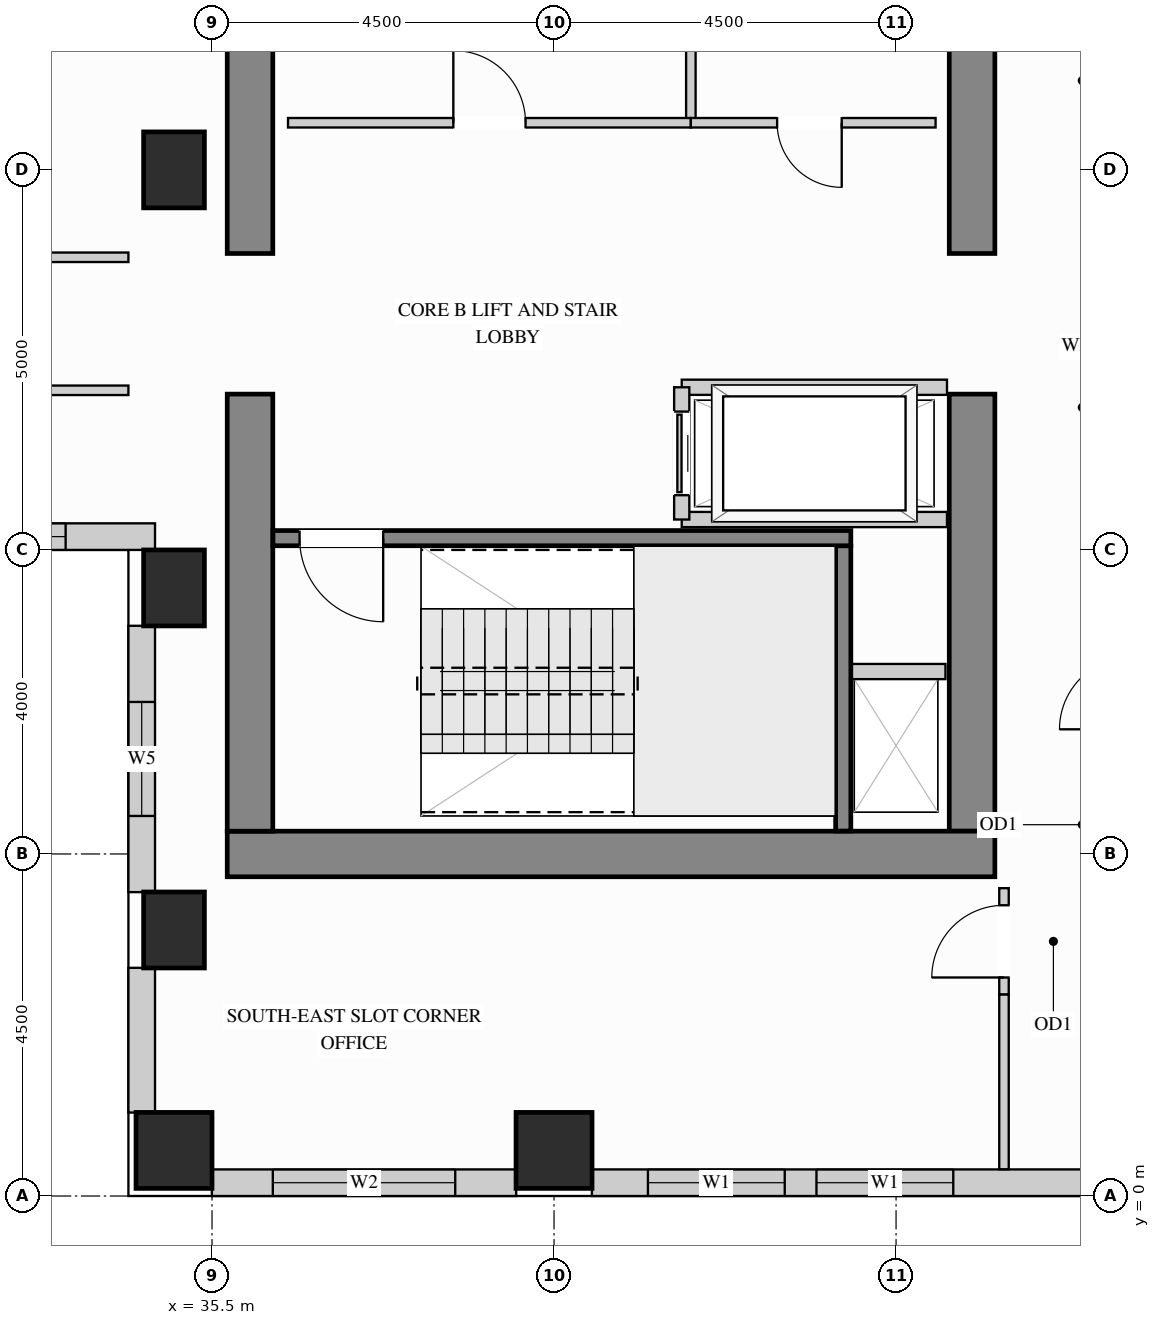
"""IFC4 building model, lengths in metres.
Left out: names, types, materials, properties, quantities, classifications, styles, units other than length and angle.
Written with IfcOpenShell. Run it as: python <this file> out.ifc"""

import sys

from ifc_helpers import new_model, si_unit, direction, frame, frame_2d, origin, origin_2d, place, context, subcontext, project, spatial, rectangle, extrude, source, transform, mapped, element, fill, save


model = new_model("IFC4")
c1 = context("Model", 3, precision=1e-05, world=origin(), true_north=direction((0.0, 1.0)))
c2 = subcontext(c1, "Body", "Model", "MODEL_VIEW")
j1 = project(units=[si_unit("LENGTHUNIT", "METRE"), si_unit("PLANEANGLEUNIT", "RADIAN")], contexts=[c1])
p1 = place(None, origin())
s1 = spatial("IfcSite", under=j1, at=p1, CompositionType="ELEMENT")
p2 = place(p1, origin())
s2 = spatial("IfcBuilding", under=s1, at=p2, CompositionType="ELEMENT")
p3 = place(p2, frame((0.0, 0.0, 153.9)))
s3 = spatial("IfcBuildingStorey", under=s2, at=p3, CompositionType="ELEMENT", Elevation=153.9)
m1 = source(origin(), c2, "Body", "SweptSolid", [
    extrude(rectangle(XDim=0.8, YDim=1.0, at=origin_2d()), origin(), (0.0, 0.0, 1.0), 3.4),
])
for number, where, z_axis, x_axis in (
    (1, (35.0, 13.5, 0.0), (0.0, 0.0, 1.0), (1.0, 0.0, 0.0)),
    (2, (35.0, 3.5, 0.0), (0.0, 0.0, 1.0), (1.0, 0.0, 0.0)),
    (3, (35.0, 8.0, 0.0), (0.0, 0.0, 1.0), (1.0, 0.0, 0.0)),
):
    element("IfcColumn", number, at=place(p3, frame(where, z_axis=z_axis, x_axis=x_axis)), inside=s3, PredefinedType="COLUMN", context=c2, shape_type="MappedRepresentation", body=[
        mapped(m1, transform((0.0, 0.0, 0.0), x_axis=(1.0, 0.0, 0.0), y_axis=(0.0, 1.0, 0.0), z_axis=(0.0, 0.0, 1.0))),
    ])
m2 = source(origin(), c2, "Body", "SweptSolid", [
    extrude(rectangle(XDim=1.0, YDim=1.0, at=origin_2d()), origin(), (0.0, 0.0, 1.0), 3.4),
])
for number, where, z_axis, x_axis in (
    (4, (35.0, 0.6, 0.0), (0.0, 0.0, 1.0), (1.0, 0.0, 0.0)),
    (5, (40.0, 0.6, 0.0), (0.0, 0.0, 1.0), (1.0, 0.0, 0.0)),
):
    element("IfcColumn", number, at=place(p3, frame(where, z_axis=z_axis, x_axis=x_axis)), inside=s3, PredefinedType="COLUMN", context=c2, shape_type="MappedRepresentation", body=[
        mapped(m2, transform((0.0, 0.0, 0.0), x_axis=(1.0, 0.0, 0.0), y_axis=(0.0, 1.0, 0.0), z_axis=(0.0, 0.0, 1.0))),
    ])
m3 = source(origin(), c2, "Body", "SweptSolid", [
    extrude(rectangle(XDim=5.75, YDim=0.6, at=frame_2d((2.875, 0.0))), origin(), (0.0, 0.0, 1.0), 3.4),
])
p4 = place(p3, frame((45.5, 4.8, 0.0), z_axis=(0.0, 0.0, 1.0), x_axis=(0.0, 1.0, 0.0)))
e6 = element("IfcWall", 6, at=p4, inside=s3, PredefinedType="SHEAR", context=c2, shape_type="MappedRepresentation", body=[
    mapped(m3, transform((0.0, 0.0, 0.0), x_axis=(1.0, 0.0, 0.0), y_axis=(0.0, 1.0, 0.0), z_axis=(0.0, 0.0, 1.0))),
])
m4 = source(origin(), c2, "Body", "SweptSolid", [
    extrude(rectangle(XDim=3.8, YDim=0.6, at=frame_2d((1.9, 0.0))), origin(), (0.0, 0.0, 1.0), 3.4),
])
p5 = place(p3, frame((45.5, 12.4, 0.0), z_axis=(0.0, 0.0, 1.0), x_axis=(0.0, 1.0, 0.0)))
e7 = element("IfcWall", 7, at=p5, inside=s3, PredefinedType="SHEAR", context=c2, shape_type="MappedRepresentation", body=[
    mapped(m4, transform((0.0, 0.0, 0.0), x_axis=(1.0, 0.0, 0.0), y_axis=(0.0, 1.0, 0.0), z_axis=(0.0, 0.0, 1.0))),
])
m5 = source(origin(), c2, "Body", "SweptSolid", [
    extrude(rectangle(XDim=10.1, YDim=0.6, at=frame_2d((5.05, 0.0))), origin(), (0.0, 0.0, 1.0), 3.4),
])
p6 = place(p3, frame((35.7, 4.5, 0.0), z_axis=(0.0, 0.0, 1.0), x_axis=(1.0, 0.0, 0.0)))
e8 = element("IfcWall", 8, at=p6, inside=s3, PredefinedType="SHEAR", context=c2, shape_type="MappedRepresentation", body=[
    mapped(m5, transform((0.0, 0.0, 0.0), x_axis=(1.0, 0.0, 0.0), y_axis=(0.0, 1.0, 0.0), z_axis=(0.0, 0.0, 1.0))),
])
p7 = place(p3, frame((36.0, 4.8, 0.0), z_axis=(0.0, 0.0, 1.0), x_axis=(0.0, 1.0, 0.0)))
e9 = element("IfcWall", 9, at=p7, inside=s3, PredefinedType="SHEAR", context=c2, shape_type="MappedRepresentation", body=[
    mapped(m3, transform((0.0, 0.0, 0.0), x_axis=(1.0, 0.0, 0.0), y_axis=(0.0, 1.0, 0.0), z_axis=(0.0, 0.0, 1.0))),
])
p8 = place(p3, frame((36.0, 12.4, 0.0), z_axis=(0.0, 0.0, 1.0), x_axis=(0.0, 1.0, 0.0)))
e10 = element("IfcWall", 10, at=p8, inside=s3, PredefinedType="SHEAR", context=c2, shape_type="MappedRepresentation", body=[
    mapped(m4, transform((0.0, 0.0, 0.0), x_axis=(1.0, 0.0, 0.0), y_axis=(0.0, 1.0, 0.0), z_axis=(0.0, 0.0, 1.0))),
])
p9 = place(p3, frame((30.898, 8.675, 0.0), z_axis=(0.0, 0.0, 1.0), x_axis=(1.0, 0.0, 0.0)))
e11 = element("IfcWall", 11, at=p9, inside=s3, PredefinedType="SOLIDWALL", context=c2, shape_type="SweptSolid", body=[
    extrude(rectangle(XDim=3.852, YDim=0.35, at=frame_2d((1.926, 0.0))), origin(), (0.0, 0.0, 1.0), 3.385),
])
p10 = place(p9, frame((1.176, 0.0, 0.78)))
e12 = element("IfcOpeningElement", 12, at=p10, cuts=e11, PredefinedType="OPENING", context=c2, shape_type="SweptSolid", body=[
    extrude(rectangle(XDim=1.5, YDim=2.0, at=frame_2d((0.75, 1.0))), frame((0.0, 0.185, 0.0), z_axis=(0.0, -1.0, 0.0), x_axis=(1.0, 0.0, 0.0)), (0.0, 0.0, 1.0), 0.37),
])
p11 = place(p3, frame((34.575, 7.502, 0.0), z_axis=(0.0, 0.0, 1.0), x_axis=(0.0, -1.0, 0.0)))
e13 = element("IfcWall", 13, at=p11, inside=s3, PredefinedType="SOLIDWALL", context=c2, shape_type="SweptSolid", body=[
    extrude(rectangle(XDim=3.504, YDim=0.35, at=frame_2d((1.752, 0.0))), origin(), (0.0, 0.0, 1.0), 2.612),
])
p12 = place(p11, frame((1.002, 0.0, 0.78)))
e14 = element("IfcOpeningElement", 14, at=p12, cuts=e13, PredefinedType="OPENING", context=c2, shape_type="SweptSolid", body=[
    extrude(rectangle(XDim=1.5, YDim=1.652, at=frame_2d((0.75, 0.826))), frame((0.0, 0.185, 0.0), z_axis=(0.0, -1.0, 0.0), x_axis=(1.0, 0.0, 0.0)), (0.0, 0.0, 1.0), 0.37),
])
m6 = source(origin(), c2, "Body", "SweptSolid", [
    extrude(rectangle(XDim=1.904, YDim=0.35, at=frame_2d((0.952, 0.0))), origin(), (0.0, 0.0, 1.0), 2.612),
])
p13 = place(p3, frame((34.575, 3.002, 0.0), z_axis=(0.0, 0.0, 1.0), x_axis=(0.0, -1.0, 0.0)))
e15 = element("IfcWall", 15, at=p13, inside=s3, PredefinedType="SOLIDWALL", context=c2, shape_type="MappedRepresentation", body=[
    mapped(m6, transform((0.0, 0.0, 0.0), x_axis=(1.0, 0.0, 0.0), y_axis=(0.0, 1.0, 0.0), z_axis=(0.0, 0.0, 1.0))),
])
p14 = place(p3, frame((35.498, 0.175, 0.0), z_axis=(0.0, 0.0, 1.0), x_axis=(1.0, 0.0, 0.0)))
e16 = element("IfcWall", 16, at=p14, inside=s3, PredefinedType="SOLIDWALL", context=c2, shape_type="SweptSolid", body=[
    extrude(rectangle(XDim=4.004, YDim=0.35, at=frame_2d((2.002, 0.0))), origin(), (0.0, 0.0, 1.0), 2.612),
])
p15 = place(p14, frame((0.802, 0.0, 0.78)))
e17 = element("IfcOpeningElement", 17, at=p15, cuts=e16, PredefinedType="OPENING", context=c2, shape_type="SweptSolid", body=[
    extrude(rectangle(XDim=2.4, YDim=1.652, at=frame_2d((1.2, 0.826))), frame((0.0, 0.185, 0.0), z_axis=(0.0, -1.0, 0.0), x_axis=(1.0, 0.0, 0.0)), (0.0, 0.0, 1.0), 0.37),
])
p16 = place(p3, frame((40.498, 0.175, 0.0), z_axis=(0.0, 0.0, 1.0), x_axis=(1.0, 0.0, 0.0)))
e18 = element("IfcWall", 18, at=p16, inside=s3, PredefinedType="SOLIDWALL", context=c2, shape_type="SweptSolid", body=[
    extrude(rectangle(XDim=6.604, YDim=0.35, at=frame_2d((3.302, 0.0))), origin(), (0.0, 0.0, 1.0), 2.612),
])
p17 = place(p16, frame((0.737, 0.0, 0.78)))
e19 = element("IfcOpeningElement", 19, at=p17, cuts=e18, PredefinedType="OPENING", context=c2, shape_type="SweptSolid", body=[
    extrude(rectangle(XDim=1.8, YDim=1.652, at=frame_2d((0.9, 0.826))), frame((0.0, 0.185, 0.0), z_axis=(0.0, -1.0, 0.0), x_axis=(1.0, 0.0, 0.0)), (0.0, 0.0, 1.0), 0.37),
])
p18 = place(p16, frame((2.955, 0.0, 0.78)))
e20 = element("IfcOpeningElement", 20, at=p18, cuts=e18, PredefinedType="OPENING", context=c2, shape_type="SweptSolid", body=[
    extrude(rectangle(XDim=1.8, YDim=1.652, at=frame_2d((0.9, 0.826))), frame((0.0, 0.185, 0.0), z_axis=(0.0, -1.0, 0.0), x_axis=(1.0, 0.0, 0.0)), (0.0, 0.0, 1.0), 0.37),
])
m7 = source(origin(), c2, "Body", "SweptSolid", [
    extrude(rectangle(XDim=1.93, YDim=0.125, at=frame_2d((0.965, 0.0))), origin(), (0.0, 0.0, 1.0), 3.385),
])
p19 = place(p3, frame((41.8, 14.12, 0.0), z_axis=(0.0, 0.0, 1.0), x_axis=(0.0, 1.0, 0.0)))
e21 = element("IfcWall", 21, at=p19, inside=s3, PredefinedType="PARTITIONING", context=c2, shape_type="MappedRepresentation", body=[
    mapped(m7, transform((0.0, 0.0, 0.0), x_axis=(1.0, 0.0, 0.0), y_axis=(0.0, 1.0, 0.0), z_axis=(0.0, 0.0, 1.0))),
])
p20 = place(p3, frame((36.5, 14.12, 0.0), z_axis=(0.0, 0.0, 1.0), x_axis=(1.0, 0.0, 0.0)))
e22 = element("IfcWall", 22, at=p20, inside=s3, PredefinedType="PARTITIONING", context=c2, shape_type="SweptSolid", body=[
    extrude(rectangle(XDim=5.3, YDim=0.125, at=frame_2d((2.65, 0.0))), origin(), (0.0, 0.0, 1.0), 3.385),
])
p21 = place(p20, frame((2.175, 0.0, 0.0)))
e23 = element("IfcOpeningElement", 23, at=p21, cuts=e22, PredefinedType="OPENING", context=c2, shape_type="SweptSolid", body=[
    extrude(rectangle(XDim=0.95, YDim=2.15, at=frame_2d((0.475, 1.075))), frame((0.0, 0.073, 0.0), z_axis=(0.0, -1.0, 0.0), x_axis=(1.0, 0.0, 0.0)), (0.0, 0.0, 1.0), 0.145),
])
p22 = place(p3, frame((41.8, 14.12, 0.0), z_axis=(0.0, 0.0, 1.0), x_axis=(1.0, 0.0, 0.0)))
e24 = element("IfcWall", 24, at=p22, inside=s3, PredefinedType="PARTITIONING", context=c2, shape_type="SweptSolid", body=[
    extrude(rectangle(XDim=3.22, YDim=0.125, at=frame_2d((1.61, 0.0))), origin(), (0.0, 0.0, 1.0), 3.385),
])
p23 = place(p22, frame((1.135, 0.0, 0.0)))
e25 = element("IfcOpeningElement", 25, at=p23, cuts=e24, PredefinedType="OPENING", context=c2, shape_type="SweptSolid", body=[
    extrude(rectangle(XDim=0.85, YDim=2.1, at=frame_2d((0.425, 1.05))), frame((0.0, 0.073, 0.0), z_axis=(0.0, -1.0, 0.0), x_axis=(1.0, 0.0, 0.0)), (0.0, 0.0, 1.0), 0.145),
])
p24 = place(p3, frame((45.92, 2.65, 0.0), z_axis=(0.0, 0.0, 1.0), x_axis=(0.0, 1.0, 0.0)))
e26 = element("IfcWall", 26, at=p24, inside=s3, PredefinedType="PARTITIONING", context=c2, shape_type="SweptSolid", body=[
    extrude(rectangle(XDim=1.4, YDim=0.125, at=frame_2d((0.7, 0.0))), origin(), (0.0, 0.0, 1.0), 3.385),
])
p25 = place(p24, frame((0.225, 0.0, 0.0)))
e27 = element("IfcOpeningElement", 27, at=p25, cuts=e26, PredefinedType="OPENING", context=c2, shape_type="SweptSolid", body=[
    extrude(rectangle(XDim=0.95, YDim=2.15, at=frame_2d((0.475, 1.075))), frame((0.0, 0.073, 0.0), z_axis=(0.0, -1.0, 0.0), x_axis=(1.0, 0.0, 0.0)), (0.0, 0.0, 1.0), 0.145),
])
m8 = source(origin(), c2, "Body", "SweptSolid", [
    extrude(rectangle(XDim=2.298, YDim=0.125, at=frame_2d((1.149, 0.0))), origin(), (0.0, 0.0, 1.0), 3.385),
])
p26 = place(p3, frame((45.92, 0.352, 0.0), z_axis=(0.0, 0.0, 1.0), x_axis=(0.0, 1.0, 0.0)))
e28 = element("IfcWall", 28, at=p26, inside=s3, PredefinedType="PARTITIONING", context=c2, shape_type="MappedRepresentation", body=[
    mapped(m8, transform((0.0, 0.0, 0.0), x_axis=(1.0, 0.0, 0.0), y_axis=(0.0, 1.0, 0.0), z_axis=(0.0, 0.0, 1.0))),
])
p27 = place(p3, frame((29.85, 12.35, 0.0), z_axis=(0.0, 0.0, 1.0), x_axis=(1.0, 0.0, 0.0)))
e29 = element("IfcWall", 29, at=p27, inside=s3, PredefinedType="PARTITIONING", context=c2, shape_type="SweptSolid", body=[
    extrude(rectangle(XDim=4.55, YDim=0.125, at=frame_2d((2.275, 0.0))), origin(), (0.0, 0.0, 1.0), 3.385),
])
p28 = place(p27, frame((1.8, 0.0, 0.0)))
e30 = element("IfcOpeningElement", 30, at=p28, cuts=e29, PredefinedType="OPENING", context=c2, shape_type="SweptSolid", body=[
    extrude(rectangle(XDim=0.95, YDim=2.15, at=frame_2d((0.475, 1.075))), frame((0.0, 0.073, 0.0), z_axis=(0.0, -1.0, 0.0), x_axis=(1.0, 0.0, 0.0)), (0.0, 0.0, 1.0), 0.145),
])
p29 = place(p3, frame((19.5, 10.6, 0.0), z_axis=(0.0, 0.0, 1.0), x_axis=(1.0, 0.0, 0.0)))
e31 = element("IfcWall", 31, at=p29, inside=s3, PredefinedType="PARTITIONING", context=c2, shape_type="SweptSolid", body=[
    extrude(rectangle(XDim=14.9, YDim=0.125, at=frame_2d((7.45, 0.0))), origin(), (0.0, 0.0, 1.0), 3.385),
])
p30 = place(p29, frame((6.975, 0.0, 0.0)))
e32 = element("IfcOpeningElement", 32, at=p30, cuts=e31, PredefinedType="OPENING", context=c2, shape_type="SweptSolid", body=[
    extrude(rectangle(XDim=0.95, YDim=2.15, at=frame_2d((0.475, 1.075))), frame((0.0, 0.073, 0.0), z_axis=(0.0, -1.0, 0.0), x_axis=(1.0, 0.0, 0.0)), (0.0, 0.0, 1.0), 0.145),
])
m9 = source(origin(), c2, "Body", "SweptSolid", [
    extrude(rectangle(XDim=1.3, YDim=0.2, at=frame_2d((0.65, 0.0))), origin(), (0.0, 0.0, 1.0), 3.385),
])
p31 = place(p3, frame((43.85, 6.9, 0.0), z_axis=(0.0, 0.0, 1.0), x_axis=(1.0, 0.0, 0.0)))
e33 = element("IfcWall", 33, at=p31, inside=s3, PredefinedType="PARTITIONING", context=c2, shape_type="MappedRepresentation", body=[
    mapped(m9, transform((0.0, 0.0, 0.0), x_axis=(1.0, 0.0, 0.0), y_axis=(0.0, 1.0, 0.0), z_axis=(0.0, 0.0, 1.0))),
])
m10 = source(origin(), c2, "Body", "SweptSolid", [
    extrude(rectangle(XDim=3.49, YDim=0.2, at=frame_2d((1.745, 0.0))), origin(), (0.0, 0.0, 1.0), 3.385),
])
for number, where, z_axis, x_axis in (
    (34, (41.68, 10.64, 0.0), (0.0, 0.0, 1.0), (1.0, 0.0, 0.0)),
    (35, (41.68, 8.9, 0.0), (0.0, 0.0, 1.0), (1.0, 0.0, 0.0)),
):
    element("IfcWall", number, at=place(p3, frame(where, z_axis=z_axis, x_axis=x_axis)), inside=s3, PredefinedType="PARTITIONING", context=c2, shape_type="MappedRepresentation", body=[
        mapped(m10, transform((0.0, 0.0, 0.0), x_axis=(1.0, 0.0, 0.0), y_axis=(0.0, 1.0, 0.0), z_axis=(0.0, 0.0, 1.0))),
    ])
p32 = place(p3, frame((41.68, 8.9, 0.0), z_axis=(0.0, 0.0, 1.0), x_axis=(0.0, 1.0, 0.0)))
e36 = element("IfcWall", 36, at=p32, inside=s3, PredefinedType="PARTITIONING", context=c2, shape_type="SweptSolid", body=[
    extrude(rectangle(XDim=1.74, YDim=0.2, at=frame_2d((0.87, 0.0))), origin(), (0.0, 0.0, 1.0), 3.385),
])
p33 = place(p32, frame((0.32, 0.0, 0.0)))
e37 = element("IfcOpeningElement", 37, at=p33, cuts=e36, PredefinedType="OPENING", context=c2, shape_type="SweptSolid", body=[
    extrude(rectangle(XDim=1.1, YDim=2.2, at=frame_2d((0.55, 1.1))), frame((0.0, 0.11, 0.0), z_axis=(0.0, -1.0, 0.0), x_axis=(1.0, 0.0, 0.0)), (0.0, 0.0, 1.0), 0.22),
])
m11 = source(origin(), c2, "Body", "SweptSolid", [
    extrude(rectangle(XDim=3.753, YDim=0.2, at=frame_2d((1.876, 0.0))), origin(), (0.0, 0.0, 1.0), 3.4),
])
p34 = place(p3, frame((43.805, 4.802, 0.0), z_axis=(0.0, 0.0, 1.0), x_axis=(0.0, 1.0, 0.0)))
e38 = element("IfcWall", 38, at=p34, inside=s3, PredefinedType="SHEAR", context=c2, shape_type="MappedRepresentation", body=[
    mapped(m11, transform((0.0, 0.0, 0.0), x_axis=(1.0, 0.0, 0.0), y_axis=(0.0, 1.0, 0.0), z_axis=(0.0, 0.0, 1.0))),
])
p35 = place(p3, frame((36.302, 8.655, 0.0), z_axis=(0.0, 0.0, 1.0), x_axis=(1.0, 0.0, 0.0)))
e39 = element("IfcWall", 39, at=p35, inside=s3, PredefinedType="SHEAR", context=c2, shape_type="SweptSolid", body=[
    extrude(rectangle(XDim=7.603, YDim=0.2, at=frame_2d((3.802, 0.0))), origin(), (0.0, 0.0, 1.0), 3.4),
])
p36 = place(p35, frame((0.35, 0.0, 0.0)))
e40 = element("IfcOpeningElement", 40, at=p36, cuts=e39, PredefinedType="OPENING", context=c2, shape_type="SweptSolid", body=[
    extrude(rectangle(XDim=1.1, YDim=2.15, at=frame_2d((0.55, 1.075))), frame((0.0, 0.11, 0.0), z_axis=(0.0, -1.0, 0.0), x_axis=(1.0, 0.0, 0.0)), (0.0, 0.0, 1.0), 0.22),
])
m12 = source(origin(), c2, "Body", "SweptSolid", [
    extrude(rectangle(XDim=1.1, YDim=2.2, at=frame_2d((0.55, 1.1))), frame((0.0, 0.025, 0.0), z_axis=(0.0, -1.0, 0.0), x_axis=(1.0, 0.0, 0.0)), (0.0, 0.0, 1.0), 0.05),
])
p37 = place(p33, origin())
e41 = element("IfcDoor", 41, at=p37, inside=s3, OperationType="SLIDING_TO_LEFT", PredefinedType="DOOR", context=c2, shape_type="MappedRepresentation", body=[
    mapped(m12, transform((0.0, 0.0, 0.0), x_axis=(1.0, 0.0, 0.0), y_axis=(0.0, 1.0, 0.0), z_axis=(0.0, 0.0, 1.0))),
])
fill(e37, e41)
m13 = source(origin(), c2, "Body", "SweptSolid", [
    extrude(rectangle(XDim=0.95, YDim=2.15, at=frame_2d((0.475, 1.075))), frame((0.0, 0.025, 0.0), z_axis=(0.0, -1.0, 0.0), x_axis=(1.0, 0.0, 0.0)), (0.0, 0.0, 1.0), 0.05),
])
p38 = place(p21, origin())
e42 = element("IfcDoor", 42, at=p38, inside=s3, OperationType="SINGLE_SWING_LEFT", PredefinedType="DOOR", context=c2, shape_type="MappedRepresentation", body=[
    mapped(m13, transform((0.0, 0.0, 0.0), x_axis=(1.0, 0.0, 0.0), y_axis=(0.0, 1.0, 0.0), z_axis=(0.0, 0.0, 1.0))),
])
fill(e23, e42)
p39 = place(p25, origin())
e43 = element("IfcDoor", 43, at=p39, inside=s3, OperationType="SINGLE_SWING_LEFT", PredefinedType="DOOR", context=c2, shape_type="MappedRepresentation", body=[
    mapped(m13, transform((0.0, 0.0, 0.0), x_axis=(1.0, 0.0, 0.0), y_axis=(0.0, 1.0, 0.0), z_axis=(0.0, 0.0, 1.0))),
])
fill(e27, e43)
m14 = source(origin(), c2, "Body", "SweptSolid", [
    extrude(rectangle(XDim=0.85, YDim=2.1, at=frame_2d((0.425, 1.05))), frame((0.0, 0.025, 0.0), z_axis=(0.0, -1.0, 0.0), x_axis=(1.0, 0.0, 0.0)), (0.0, 0.0, 1.0), 0.05),
])
p40 = place(p23, origin())
e44 = element("IfcDoor", 44, at=p40, inside=s3, OperationType="SINGLE_SWING_RIGHT", PredefinedType="DOOR", context=c2, shape_type="MappedRepresentation", body=[
    mapped(m14, transform((0.0, 0.0, 0.0), x_axis=(1.0, 0.0, 0.0), y_axis=(0.0, 1.0, 0.0), z_axis=(0.0, 0.0, 1.0))),
])
fill(e25, e44)
m15 = source(origin(), c2, "Body", "SweptSolid", [
    extrude(rectangle(XDim=1.1, YDim=2.15, at=frame_2d((0.55, 1.075))), frame((0.0, 0.025, 0.0), z_axis=(0.0, -1.0, 0.0), x_axis=(1.0, 0.0, 0.0)), (0.0, 0.0, 1.0), 0.05),
])
p41 = place(p36, origin())
e45 = element("IfcDoor", 45, at=p41, inside=s3, OperationType="SINGLE_SWING_RIGHT", PredefinedType="DOOR", context=c2, shape_type="MappedRepresentation", body=[
    mapped(m15, transform((0.0, 0.0, 0.0), x_axis=(1.0, 0.0, 0.0), y_axis=(0.0, 1.0, 0.0), z_axis=(0.0, 0.0, 1.0))),
])
fill(e40, e45)
m16 = source(origin(), c2, "Body", "SweptSolid", [
    extrude(rectangle(XDim=1.8, YDim=1.652, at=frame_2d((0.9, 0.826))), frame((0.0, 0.03, 0.0), z_axis=(0.0, -1.0, 0.0), x_axis=(1.0, 0.0, 0.0)), (0.0, 0.0, 1.0), 0.06),
])
p42 = place(p17, origin())
e46 = element("IfcWindow", 46, at=p42, inside=s3, PartitioningType="SINGLE_PANEL", PredefinedType="WINDOW", context=c2, shape_type="MappedRepresentation", body=[
    mapped(m16, transform((0.0, 0.0, 0.0), x_axis=(1.0, 0.0, 0.0), y_axis=(0.0, 1.0, 0.0), z_axis=(0.0, 0.0, 1.0))),
])
fill(e19, e46)
p43 = place(p18, origin())
e47 = element("IfcWindow", 47, at=p43, inside=s3, PartitioningType="SINGLE_PANEL", PredefinedType="WINDOW", context=c2, shape_type="MappedRepresentation", body=[
    mapped(m16, transform((0.0, 0.0, 0.0), x_axis=(1.0, 0.0, 0.0), y_axis=(0.0, 1.0, 0.0), z_axis=(0.0, 0.0, 1.0))),
])
fill(e20, e47)
m17 = source(origin(), c2, "Body", "SweptSolid", [
    extrude(rectangle(XDim=2.4, YDim=1.652, at=frame_2d((1.2, 0.826))), frame((0.0, 0.03, 0.0), z_axis=(0.0, -1.0, 0.0), x_axis=(1.0, 0.0, 0.0)), (0.0, 0.0, 1.0), 0.06),
])
p44 = place(p15, origin())
e48 = element("IfcWindow", 48, at=p44, inside=s3, PartitioningType="SINGLE_PANEL", PredefinedType="WINDOW", context=c2, shape_type="MappedRepresentation", body=[
    mapped(m17, transform((0.0, 0.0, 0.0), x_axis=(1.0, 0.0, 0.0), y_axis=(0.0, 1.0, 0.0), z_axis=(0.0, 0.0, 1.0))),
])
fill(e17, e48)
m18 = source(origin(), c2, "Body", "SweptSolid", [
    extrude(rectangle(XDim=1.5, YDim=2.0, at=frame_2d((0.75, 1.0))), frame((0.0, 0.03, 0.0), z_axis=(0.0, -1.0, 0.0), x_axis=(1.0, 0.0, 0.0)), (0.0, 0.0, 1.0), 0.06),
])
p45 = place(p10, origin())
e49 = element("IfcWindow", 49, at=p45, inside=s3, PartitioningType="SINGLE_PANEL", PredefinedType="WINDOW", context=c2, shape_type="MappedRepresentation", body=[
    mapped(m18, transform((0.0, 0.0, 0.0), x_axis=(1.0, 0.0, 0.0), y_axis=(0.0, 1.0, 0.0), z_axis=(0.0, 0.0, 1.0))),
])
fill(e12, e49)
m19 = source(origin(), c2, "Body", "SweptSolid", [
    extrude(rectangle(XDim=1.5, YDim=1.652, at=frame_2d((0.75, 0.826))), frame((0.0, 0.03, 0.0), z_axis=(0.0, -1.0, 0.0), x_axis=(1.0, 0.0, 0.0)), (0.0, 0.0, 1.0), 0.06),
])
p46 = place(p12, origin())
e50 = element("IfcWindow", 50, at=p46, inside=s3, PartitioningType="SINGLE_PANEL", PredefinedType="WINDOW", context=c2, shape_type="MappedRepresentation", body=[
    mapped(m19, transform((0.0, 0.0, 0.0), x_axis=(1.0, 0.0, 0.0), y_axis=(0.0, 1.0, 0.0), z_axis=(0.0, 0.0, 1.0))),
])
fill(e14, e50)
save(model, sys.argv[1])
